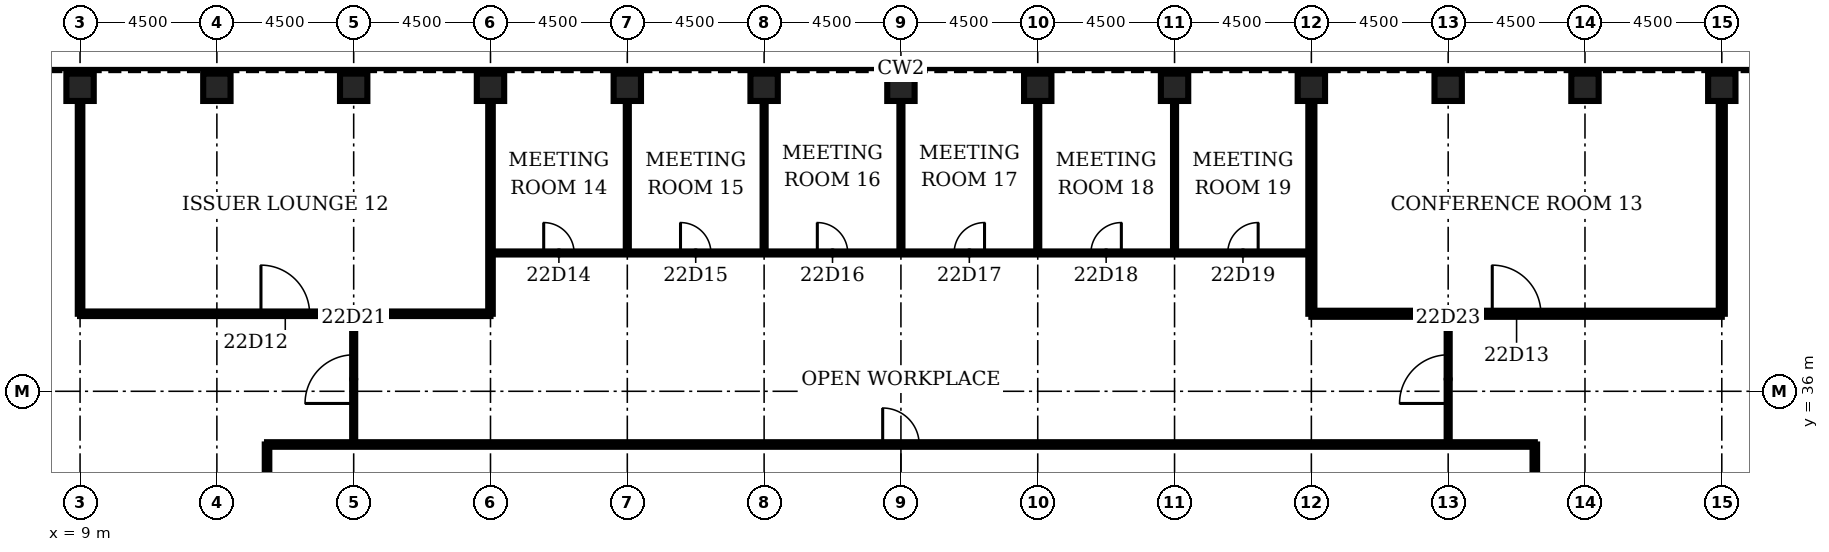
"""IFC4 building model, lengths in metres.
Left out: names, types, materials, properties, quantities, classifications, styles, units other than length and angle.
Written with IfcOpenShell. Run it as: python <this file> out.ifc"""

import sys

from ifc_helpers import new_model, si_unit, direction, frame, frame_2d, origin, origin_2d, place, context, subcontext, project, spatial, rectangle, hollow_rectangle, extrude, element, fill, save


model = new_model("IFC4")
c1 = context("Model", 3, precision=1e-05, world=origin(), true_north=direction((0.0, 1.0)))
c2 = subcontext(c1, "Body", "Model", "MODEL_VIEW")
j1 = project(units=[si_unit("LENGTHUNIT", "METRE"), si_unit("PLANEANGLEUNIT", "RADIAN")], contexts=[c1])
p1 = place(None, origin())
s1 = spatial("IfcSite", under=j1, at=p1, CompositionType="ELEMENT")
p2 = place(p1, origin())
s2 = spatial("IfcBuilding", under=s1, at=p2, CompositionType="ELEMENT")
p3 = place(p2, frame((0.0, 0.0, 104.7)))
s3 = spatial("IfcBuildingStorey", under=s2, at=p3, CompositionType="ELEMENT", Elevation=104.7)
for number, where, z_axis, x_axis in (
    (1, (63.0, 46.0, 0.0), (0.0, 0.0, 1.0), (0.0, 1.0, 0.0)),
    (2, (58.5, 46.0, 0.0), (0.0, 0.0, 1.0), (0.0, 1.0, 0.0)),
    (3, (54.0, 46.0, 0.0), (0.0, 0.0, 1.0), (0.0, 1.0, 0.0)),
    (4, (49.5, 46.0, 0.0), (0.0, 0.0, 1.0), (0.0, 1.0, 0.0)),
    (5, (45.0, 46.0, 0.0), (0.0, 0.0, 1.0), (0.0, 1.0, 0.0)),
    (6, (40.5, 46.0, 0.0), (0.0, 0.0, 1.0), (0.0, 1.0, 0.0)),
    (7, (36.0, 46.0, 0.0), (0.0, 0.0, 1.0), (0.0, 1.0, 0.0)),
    (8, (31.5, 46.0, 0.0), (0.0, 0.0, 1.0), (0.0, 1.0, 0.0)),
    (9, (27.0, 46.0, 0.0), (0.0, 0.0, 1.0), (0.0, 1.0, 0.0)),
    (10, (22.5, 46.0, 0.0), (0.0, 0.0, 1.0), (0.0, 1.0, 0.0)),
    (11, (18.0, 46.0, 0.0), (0.0, 0.0, 1.0), (0.0, 1.0, 0.0)),
    (12, (13.5, 46.0, 0.0), (0.0, 0.0, 1.0), (0.0, 1.0, 0.0)),
    (13, (9.0, 46.0, 0.0), (0.0, 0.0, 1.0), (0.0, 1.0, 0.0)),
):
    element("IfcColumn", number, at=place(p3, frame(where, z_axis=z_axis, x_axis=x_axis)), inside=s3, PredefinedType="COLUMN", context=c2, shape_type="SweptSolid", body=[
        extrude(hollow_rectangle(XDim=0.9, YDim=0.9, WallThickness=0.11, at=origin_2d()), origin(), (0.0, 0.0, 1.0), 4.2),
    ])
p4 = place(p3, frame((15.15, 34.25, 0.0), z_axis=(0.0, 0.0, 1.0), x_axis=(1.0, 0.0, 0.0)))
e14 = element("IfcWall", 14, at=p4, inside=s3, PredefinedType="PARTITIONING", context=c2, shape_type="SweptSolid", body=[
    extrude(rectangle(XDim=41.7, YDim=0.15, at=frame_2d((20.85, 0.0))), origin(), (0.0, 0.0, 1.0), 3.0),
])
p5 = place(p4, frame((20.25, 0.0, 0.0)))
e15 = element("IfcOpeningElement", 15, at=p5, cuts=e14, PredefinedType="OPENING", context=c2, shape_type="SweptSolid", body=[
    extrude(rectangle(XDim=1.2, YDim=2.1, at=frame_2d((0.6, 1.05))), frame((0.0, 0.085, 0.0), z_axis=(0.0, -1.0, 0.0), x_axis=(1.0, 0.0, 0.0)), (0.0, 0.0, 1.0), 0.17),
])
p6 = place(p3, frame((9.0, 38.55, 0.0), z_axis=(0.0, 0.0, 1.0), x_axis=(1.0, 0.0, 0.0)))
e16 = element("IfcWall", 16, at=p6, inside=s3, PredefinedType="PARTITIONING", context=c2, shape_type="SweptSolid", body=[
    extrude(rectangle(XDim=13.5, YDim=0.15, at=frame_2d((6.75, 0.0))), origin(), (0.0, 0.0, 1.0), 3.0),
])
p7 = place(p6, frame((5.95, 0.0, 0.0)))
e17 = element("IfcOpeningElement", 17, at=p7, cuts=e16, PredefinedType="OPENING", context=c2, shape_type="SweptSolid", body=[
    extrude(rectangle(XDim=1.6, YDim=2.1, at=frame_2d((0.8, 1.05))), frame((0.0, 0.085, 0.0), z_axis=(0.0, -1.0, 0.0), x_axis=(1.0, 0.0, 0.0)), (0.0, 0.0, 1.0), 0.17),
])
p8 = place(p3, frame((49.5, 38.55, 0.0), z_axis=(0.0, 0.0, 1.0), x_axis=(1.0, 0.0, 0.0)))
e18 = element("IfcWall", 18, at=p8, inside=s3, PredefinedType="PARTITIONING", context=c2, shape_type="SweptSolid", body=[
    extrude(rectangle(XDim=13.5, YDim=0.2, at=frame_2d((6.75, 0.0))), origin(), (0.0, 0.0, 1.0), 3.0),
])
p9 = place(p8, frame((5.95, 0.0, 0.0)))
e19 = element("IfcOpeningElement", 19, at=p9, cuts=e18, PredefinedType="OPENING", context=c2, shape_type="SweptSolid", body=[
    extrude(rectangle(XDim=1.6, YDim=2.1, at=frame_2d((0.8, 1.05))), frame((0.0, 0.11, 0.0), z_axis=(0.0, -1.0, 0.0), x_axis=(1.0, 0.0, 0.0)), (0.0, 0.0, 1.0), 0.22),
])
p10 = place(p3, frame((22.5, 40.55, 0.0), z_axis=(0.0, 0.0, 1.0), x_axis=(1.0, 0.0, 0.0)))
e20 = element("IfcWall", 20, at=p10, inside=s3, PredefinedType="PARTITIONING", context=c2, shape_type="SweptSolid", body=[
    extrude(rectangle(XDim=27.0, YDim=0.1, at=frame_2d((13.5, 0.0))), origin(), (0.0, 0.0, 1.0), 3.0),
])
p11 = place(p10, frame((1.75, 0.0, 0.0)))
e21 = element("IfcOpeningElement", 21, at=p11, cuts=e20, PredefinedType="OPENING", context=c2, shape_type="SweptSolid", body=[
    extrude(rectangle(XDim=1.0, YDim=2.1, at=frame_2d((0.5, 1.05))), frame((0.0, 0.06, 0.0), z_axis=(0.0, -1.0, 0.0), x_axis=(1.0, 0.0, 0.0)), (0.0, 0.0, 1.0), 0.12),
])
p12 = place(p10, frame((6.25, 0.0, 0.0)))
e22 = element("IfcOpeningElement", 22, at=p12, cuts=e20, PredefinedType="OPENING", context=c2, shape_type="SweptSolid", body=[
    extrude(rectangle(XDim=1.0, YDim=2.1, at=frame_2d((0.5, 1.05))), frame((0.0, 0.06, 0.0), z_axis=(0.0, -1.0, 0.0), x_axis=(1.0, 0.0, 0.0)), (0.0, 0.0, 1.0), 0.12),
])
p13 = place(p10, frame((10.75, 0.0, 0.0)))
e23 = element("IfcOpeningElement", 23, at=p13, cuts=e20, PredefinedType="OPENING", context=c2, shape_type="SweptSolid", body=[
    extrude(rectangle(XDim=1.0, YDim=2.1, at=frame_2d((0.5, 1.05))), frame((0.0, 0.06, 0.0), z_axis=(0.0, -1.0, 0.0), x_axis=(1.0, 0.0, 0.0)), (0.0, 0.0, 1.0), 0.12),
])
p14 = place(p10, frame((15.25, 0.0, 0.0)))
e24 = element("IfcOpeningElement", 24, at=p14, cuts=e20, PredefinedType="OPENING", context=c2, shape_type="SweptSolid", body=[
    extrude(rectangle(XDim=1.0, YDim=2.1, at=frame_2d((0.5, 1.05))), frame((0.0, 0.06, 0.0), z_axis=(0.0, -1.0, 0.0), x_axis=(1.0, 0.0, 0.0)), (0.0, 0.0, 1.0), 0.12),
])
p15 = place(p10, frame((19.75, 0.0, 0.0)))
e25 = element("IfcOpeningElement", 25, at=p15, cuts=e20, PredefinedType="OPENING", context=c2, shape_type="SweptSolid", body=[
    extrude(rectangle(XDim=1.0, YDim=2.1, at=frame_2d((0.5, 1.05))), frame((0.0, 0.06, 0.0), z_axis=(0.0, -1.0, 0.0), x_axis=(1.0, 0.0, 0.0)), (0.0, 0.0, 1.0), 0.12),
])
p16 = place(p10, frame((24.25, 0.0, 0.0)))
e26 = element("IfcOpeningElement", 26, at=p16, cuts=e20, PredefinedType="OPENING", context=c2, shape_type="SweptSolid", body=[
    extrude(rectangle(XDim=1.0, YDim=2.1, at=frame_2d((0.5, 1.05))), frame((0.0, 0.06, 0.0), z_axis=(0.0, -1.0, 0.0), x_axis=(1.0, 0.0, 0.0)), (0.0, 0.0, 1.0), 0.12),
])
p17 = place(p3, frame((9.0, 38.55, 0.0), z_axis=(0.0, 0.0, 1.0), x_axis=(0.0, 1.0, 0.0)))
e27 = element("IfcWall", 27, at=p17, inside=s3, PredefinedType="PARTITIONING", context=c2, shape_type="SweptSolid", body=[
    extrude(rectangle(XDim=7.0, YDim=0.15, at=frame_2d((3.5, 0.0))), origin(), (0.0, 0.0, 1.0), 3.0),
])
p18 = place(p3, frame((15.15, 13.75, 0.0), z_axis=(0.0, 0.0, 1.0), x_axis=(0.0, 1.0, 0.0)))
e28 = element("IfcWall", 28, at=p18, inside=s3, PredefinedType="PARTITIONING", context=c2, shape_type="SweptSolid", body=[
    extrude(rectangle(XDim=20.5, YDim=0.15, at=frame_2d((10.25, 0.0))), origin(), (0.0, 0.0, 1.0), 3.0),
])
p19 = place(p18, frame((9.65, 0.0, 0.0)))
e29 = element("IfcOpeningElement", 29, at=p19, cuts=e28, PredefinedType="OPENING", context=c2, shape_type="SweptSolid", body=[
    extrude(rectangle(XDim=1.2, YDim=2.1, at=frame_2d((0.6, 1.05))), frame((0.0, 0.085, 0.0), z_axis=(0.0, -1.0, 0.0), x_axis=(1.0, 0.0, 0.0)), (0.0, 0.0, 1.0), 0.17),
])
p20 = place(p3, frame((18.0, 34.25, 0.0), z_axis=(0.0, 0.0, 1.0), x_axis=(0.0, 1.0, 0.0)))
e30 = element("IfcWall", 30, at=p20, inside=s3, PredefinedType="PARTITIONING", context=c2, shape_type="SweptSolid", body=[
    extrude(rectangle(XDim=4.3, YDim=0.1, at=frame_2d((2.15, 0.0))), origin(), (0.0, 0.0, 1.0), 3.0),
])
p21 = place(p20, frame((1.35, 0.0, 0.0)))
e31 = element("IfcOpeningElement", 31, at=p21, cuts=e30, PredefinedType="OPENING", context=c2, shape_type="SweptSolid", body=[
    extrude(rectangle(XDim=1.6, YDim=2.1, at=frame_2d((0.8, 1.05))), frame((0.0, 0.06, 0.0), z_axis=(0.0, -1.0, 0.0), x_axis=(1.0, 0.0, 0.0)), (0.0, 0.0, 1.0), 0.12),
])
p22 = place(p3, frame((22.5, 38.55, 0.0), z_axis=(0.0, 0.0, 1.0), x_axis=(0.0, 1.0, 0.0)))
e32 = element("IfcWall", 32, at=p22, inside=s3, PredefinedType="PARTITIONING", context=c2, shape_type="SweptSolid", body=[
    extrude(rectangle(XDim=7.0, YDim=0.15, at=frame_2d((3.5, 0.0))), origin(), (0.0, 0.0, 1.0), 3.0),
])
for number, where, z_axis, x_axis in (
    (33, (27.0, 40.55, 0.0), (0.0, 0.0, 1.0), (0.0, 1.0, 0.0)),
    (34, (31.5, 40.55, 0.0), (0.0, 0.0, 1.0), (0.0, 1.0, 0.0)),
    (35, (36.0, 40.55, 0.0), (0.0, 0.0, 1.0), (0.0, 1.0, 0.0)),
    (36, (40.5, 40.55, 0.0), (0.0, 0.0, 1.0), (0.0, 1.0, 0.0)),
    (37, (45.0, 40.55, 0.0), (0.0, 0.0, 1.0), (0.0, 1.0, 0.0)),
):
    element("IfcWall", number, at=place(p3, frame(where, z_axis=z_axis, x_axis=x_axis)), inside=s3, PredefinedType="PARTITIONING", context=c2, shape_type="SweptSolid", body=[
        extrude(rectangle(XDim=5.0, YDim=0.1, at=frame_2d((2.5, 0.0))), origin(), (0.0, 0.0, 1.0), 3.0),
    ])
p23 = place(p3, frame((49.5, 38.55, 0.0), z_axis=(0.0, 0.0, 1.0), x_axis=(0.0, 1.0, 0.0)))
e38 = element("IfcWall", 38, at=p23, inside=s3, PredefinedType="PARTITIONING", context=c2, shape_type="SweptSolid", body=[
    extrude(rectangle(XDim=7.0, YDim=0.2, at=frame_2d((3.5, 0.0))), origin(), (0.0, 0.0, 1.0), 3.0),
])
p24 = place(p3, frame((54.0, 34.25, 0.0), z_axis=(0.0, 0.0, 1.0), x_axis=(0.0, 1.0, 0.0)))
e39 = element("IfcWall", 39, at=p24, inside=s3, PredefinedType="PARTITIONING", context=c2, shape_type="SweptSolid", body=[
    extrude(rectangle(XDim=4.3, YDim=0.1, at=frame_2d((2.15, 0.0))), origin(), (0.0, 0.0, 1.0), 3.0),
])
p25 = place(p24, frame((1.35, 0.0, 0.0)))
e40 = element("IfcOpeningElement", 40, at=p25, cuts=e39, PredefinedType="OPENING", context=c2, shape_type="SweptSolid", body=[
    extrude(rectangle(XDim=1.6, YDim=2.1, at=frame_2d((0.8, 1.05))), frame((0.0, 0.06, 0.0), z_axis=(0.0, -1.0, 0.0), x_axis=(1.0, 0.0, 0.0)), (0.0, 0.0, 1.0), 0.12),
])
p26 = place(p3, frame((56.85, 13.75, 0.0), z_axis=(0.0, 0.0, 1.0), x_axis=(0.0, 1.0, 0.0)))
e41 = element("IfcWall", 41, at=p26, inside=s3, PredefinedType="PARTITIONING", context=c2, shape_type="SweptSolid", body=[
    extrude(rectangle(XDim=20.5, YDim=0.15, at=frame_2d((10.25, 0.0))), origin(), (0.0, 0.0, 1.0), 3.0),
])
p27 = place(p26, frame((9.65, 0.0, 0.0)))
e42 = element("IfcOpeningElement", 42, at=p27, cuts=e41, PredefinedType="OPENING", context=c2, shape_type="SweptSolid", body=[
    extrude(rectangle(XDim=1.2, YDim=2.1, at=frame_2d((0.6, 1.05))), frame((0.0, 0.085, 0.0), z_axis=(0.0, -1.0, 0.0), x_axis=(1.0, 0.0, 0.0)), (0.0, 0.0, 1.0), 0.17),
])
p28 = place(p3, frame((63.0, 38.55, 0.0), z_axis=(0.0, 0.0, 1.0), x_axis=(0.0, 1.0, 0.0)))
e43 = element("IfcWall", 43, at=p28, inside=s3, PredefinedType="PARTITIONING", context=c2, shape_type="SweptSolid", body=[
    extrude(rectangle(XDim=7.0, YDim=0.2, at=frame_2d((3.5, 0.0))), origin(), (0.0, 0.0, 1.0), 3.0),
])
p29 = place(p7, origin())
e44 = element("IfcDoor", 44, at=p29, inside=s3, OperationType="SINGLE_SWING_LEFT", PredefinedType="DOOR", context=c2, shape_type="SweptSolid", body=[
    extrude(rectangle(XDim=1.6, YDim=2.1, at=frame_2d((0.8, 1.05))), frame((0.0, 0.025, 0.0), z_axis=(0.0, -1.0, 0.0), x_axis=(1.0, 0.0, 0.0)), (0.0, 0.0, 1.0), 0.05),
])
fill(e17, e44)
p30 = place(p9, origin())
e45 = element("IfcDoor", 45, at=p30, inside=s3, OperationType="SINGLE_SWING_LEFT", PredefinedType="DOOR", context=c2, shape_type="SweptSolid", body=[
    extrude(rectangle(XDim=1.6, YDim=2.1, at=frame_2d((0.8, 1.05))), frame((0.0, 0.025, 0.0), z_axis=(0.0, -1.0, 0.0), x_axis=(1.0, 0.0, 0.0)), (0.0, 0.0, 1.0), 0.05),
])
fill(e19, e45)
p31 = place(p11, origin())
e46 = element("IfcDoor", 46, at=p31, inside=s3, OperationType="SINGLE_SWING_LEFT", PredefinedType="DOOR", context=c2, shape_type="SweptSolid", body=[
    extrude(rectangle(XDim=1.0, YDim=2.1, at=frame_2d((0.5, 1.05))), frame((0.0, 0.025, 0.0), z_axis=(0.0, -1.0, 0.0), x_axis=(1.0, 0.0, 0.0)), (0.0, 0.0, 1.0), 0.05),
])
fill(e21, e46)
p32 = place(p12, origin())
e47 = element("IfcDoor", 47, at=p32, inside=s3, OperationType="SINGLE_SWING_LEFT", PredefinedType="DOOR", context=c2, shape_type="SweptSolid", body=[
    extrude(rectangle(XDim=1.0, YDim=2.1, at=frame_2d((0.5, 1.05))), frame((0.0, 0.025, 0.0), z_axis=(0.0, -1.0, 0.0), x_axis=(1.0, 0.0, 0.0)), (0.0, 0.0, 1.0), 0.05),
])
fill(e22, e47)
p33 = place(p13, origin())
e48 = element("IfcDoor", 48, at=p33, inside=s3, OperationType="SINGLE_SWING_LEFT", PredefinedType="DOOR", context=c2, shape_type="SweptSolid", body=[
    extrude(rectangle(XDim=1.0, YDim=2.1, at=frame_2d((0.5, 1.05))), frame((0.0, 0.025, 0.0), z_axis=(0.0, -1.0, 0.0), x_axis=(1.0, 0.0, 0.0)), (0.0, 0.0, 1.0), 0.05),
])
fill(e23, e48)
p34 = place(p14, origin())
e49 = element("IfcDoor", 49, at=p34, inside=s3, OperationType="SINGLE_SWING_RIGHT", PredefinedType="DOOR", context=c2, shape_type="SweptSolid", body=[
    extrude(rectangle(XDim=1.0, YDim=2.1, at=frame_2d((0.5, 1.05))), frame((0.0, 0.025, 0.0), z_axis=(0.0, -1.0, 0.0), x_axis=(1.0, 0.0, 0.0)), (0.0, 0.0, 1.0), 0.05),
])
fill(e24, e49)
p35 = place(p15, origin())
e50 = element("IfcDoor", 50, at=p35, inside=s3, OperationType="SINGLE_SWING_RIGHT", PredefinedType="DOOR", context=c2, shape_type="SweptSolid", body=[
    extrude(rectangle(XDim=1.0, YDim=2.1, at=frame_2d((0.5, 1.05))), frame((0.0, 0.025, 0.0), z_axis=(0.0, -1.0, 0.0), x_axis=(1.0, 0.0, 0.0)), (0.0, 0.0, 1.0), 0.05),
])
fill(e25, e50)
p36 = place(p16, origin())
e51 = element("IfcDoor", 51, at=p36, inside=s3, OperationType="SINGLE_SWING_RIGHT", PredefinedType="DOOR", context=c2, shape_type="SweptSolid", body=[
    extrude(rectangle(XDim=1.0, YDim=2.1, at=frame_2d((0.5, 1.05))), frame((0.0, 0.025, 0.0), z_axis=(0.0, -1.0, 0.0), x_axis=(1.0, 0.0, 0.0)), (0.0, 0.0, 1.0), 0.05),
])
fill(e26, e51)
p37 = place(p21, origin())
e52 = element("IfcDoor", 52, at=p37, inside=s3, OperationType="SINGLE_SWING_LEFT", PredefinedType="DOOR", context=c2, shape_type="SweptSolid", body=[
    extrude(rectangle(XDim=1.6, YDim=2.1, at=frame_2d((0.8, 1.05))), frame((0.0, 0.025, 0.0), z_axis=(0.0, -1.0, 0.0), x_axis=(1.0, 0.0, 0.0)), (0.0, 0.0, 1.0), 0.05),
])
fill(e31, e52)
p38 = place(p25, origin())
e53 = element("IfcDoor", 53, at=p38, inside=s3, OperationType="SINGLE_SWING_LEFT", PredefinedType="DOOR", context=c2, shape_type="SweptSolid", body=[
    extrude(rectangle(XDim=1.6, YDim=2.1, at=frame_2d((0.8, 1.05))), frame((0.0, 0.025, 0.0), z_axis=(0.0, -1.0, 0.0), x_axis=(1.0, 0.0, 0.0)), (0.0, 0.0, 1.0), 0.05),
])
fill(e40, e53)
p39 = place(p5, origin())
e54 = element("IfcDoor", 54, at=p39, inside=s3, OperationType="SINGLE_SWING_LEFT", PredefinedType="DOOR", context=c2, shape_type="SweptSolid", body=[
    extrude(rectangle(XDim=1.2, YDim=2.1, at=frame_2d((0.6, 1.05))), frame((0.0, 0.025, 0.0), z_axis=(0.0, -1.0, 0.0), x_axis=(1.0, 0.0, 0.0)), (0.0, 0.0, 1.0), 0.05),
])
fill(e15, e54)
save(model, sys.argv[1])
